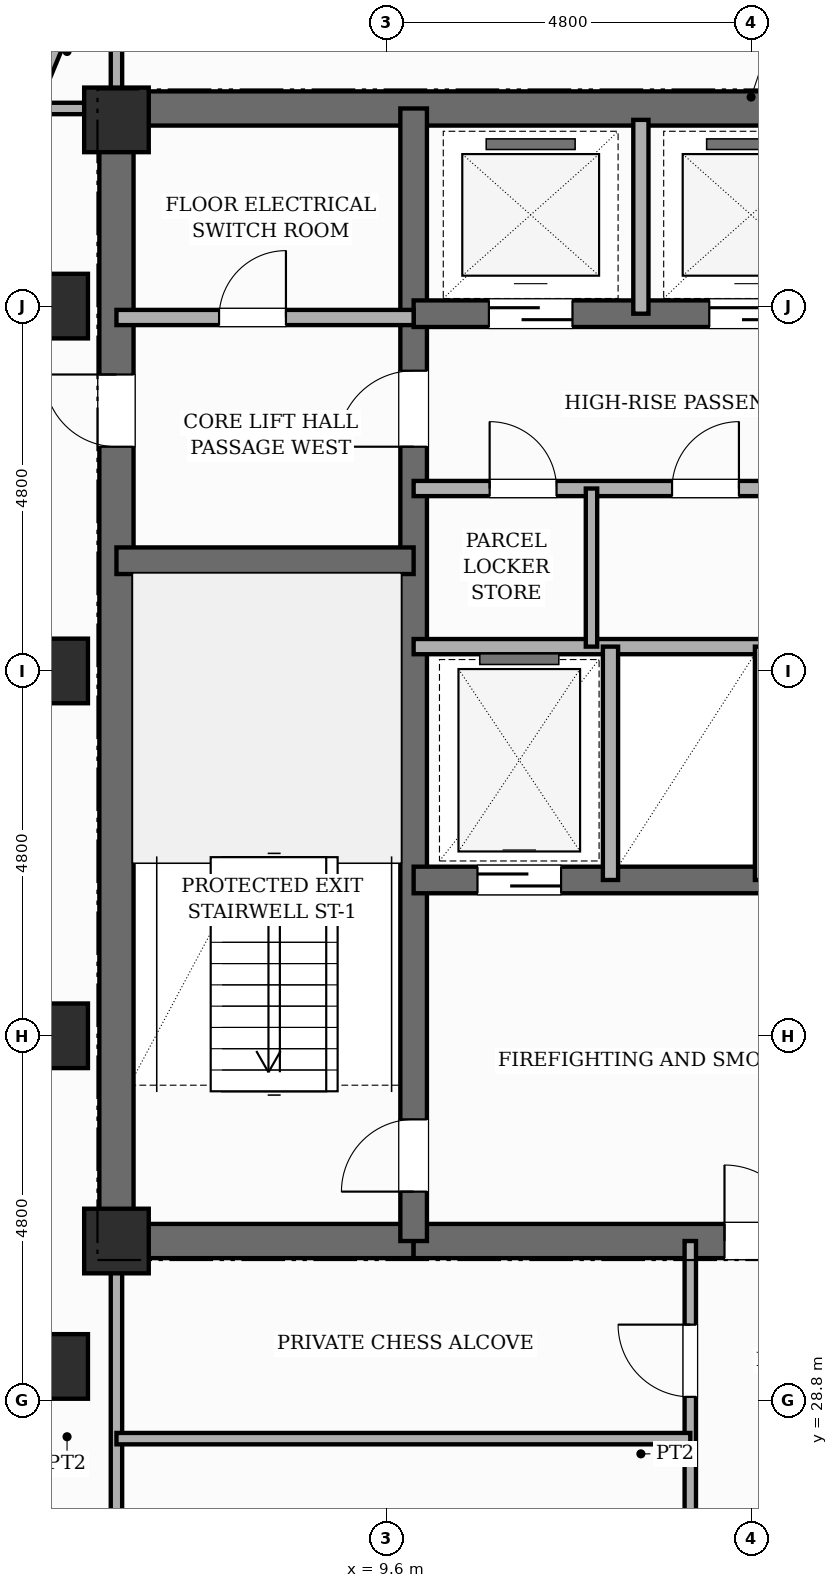
"""IFC4 building model, lengths in metres.
Left out: names, types, materials, properties, quantities, classifications, styles, units other than length and angle.
Written with IfcOpenShell. Run it as: python <this file> out.ifc"""

import sys

from ifc_helpers import new_model, si_unit, direction, frame, frame_2d, origin, origin_2d, place, context, subcontext, project, spatial, rectangle, extrude, element, fill, save


model = new_model("IFC4")
c1 = context("Model", 3, precision=1e-05, world=origin(), true_north=direction((0.0, 1.0)))
c2 = subcontext(c1, "Body", "Model", "MODEL_VIEW")
j1 = project(units=[si_unit("LENGTHUNIT", "METRE"), si_unit("PLANEANGLEUNIT", "RADIAN")], contexts=[c1])
p1 = place(None, origin())
s1 = spatial("IfcSite", under=j1, at=p1, CompositionType="ELEMENT")
p2 = place(p1, origin())
s2 = spatial("IfcBuilding", under=s1, at=p2, CompositionType="ELEMENT")
p3 = place(p2, frame((0.0, 0.0, 239.8)))
s3 = spatial("IfcBuildingStorey", under=s2, at=p3, CompositionType="ELEMENT", Elevation=239.8)
p4 = place(p3, frame((6.05, 30.675, 0.0), z_axis=(0.0, 0.0, 1.0), x_axis=(0.0, 1.0, 0.0)))
e1 = element("IfcWall", 1, at=p4, inside=s3, PredefinedType="SHEAR", context=c2, shape_type="SweptSolid", body=[
    extrude(rectangle(XDim=15.35, YDim=0.45, at=frame_2d((7.675, 0.0))), origin(), (0.0, 0.0, 1.0), 4.3),
])
p5 = place(p4, frame((10.675, 0.0, 0.0)))
e2 = element("IfcOpeningElement", 2, at=p5, cuts=e1, PredefinedType="OPENING", context=c2, shape_type="SweptSolid", body=[
    extrude(rectangle(XDim=0.95, YDim=2.15, at=frame_2d((0.475, 1.075))), frame((0.0, 0.235, 0.0), z_axis=(0.0, -1.0, 0.0), x_axis=(1.0, 0.0, 0.0)), (0.0, 0.0, 1.0), 0.47),
])
p6 = place(p3, frame((6.05, 45.8, 0.0), z_axis=(0.0, 0.0, 1.0), x_axis=(1.0, 0.0, 0.0)))
e3 = element("IfcWall", 3, at=p6, inside=s3, PredefinedType="SHEAR", context=c2, shape_type="SweptSolid", body=[
    extrude(rectangle(XDim=16.7, YDim=0.45, at=frame_2d((8.35, 0.0))), origin(), (0.0, 0.0, 1.0), 4.3),
])
p7 = place(p6, frame((13.57, 0.0, 0.0)))
e4 = element("IfcOpeningElement", 4, at=p7, cuts=e3, PredefinedType="OPENING", context=c2, shape_type="SweptSolid", body=[
    extrude(rectangle(XDim=0.95, YDim=2.15, at=frame_2d((0.475, 1.075))), frame((0.0, 0.235, 0.0), z_axis=(0.0, -1.0, 0.0), x_axis=(1.0, 0.0, 0.0)), (0.0, 0.0, 1.0), 0.47),
])
p8 = place(p3, frame((6.05, 30.9, 0.0), z_axis=(0.0, 0.0, 1.0), x_axis=(1.0, 0.0, 0.0)))
e5 = element("IfcWall", 5, at=p8, inside=s3, PredefinedType="SHEAR", context=c2, shape_type="SweptSolid", body=[
    extrude(rectangle(XDim=3.91, YDim=0.45, at=frame_2d((1.955, 0.0))), origin(), (0.0, 0.0, 1.0), 4.3),
])
p9 = place(p3, frame((9.96, 30.9, 0.0), z_axis=(0.0, 0.0, 1.0), x_axis=(1.0, 0.0, 0.0)))
e6 = element("IfcWall", 6, at=p9, inside=s3, PredefinedType="SHEAR", context=c2, shape_type="SweptSolid", body=[
    extrude(rectangle(XDim=8.88, YDim=0.45, at=frame_2d((4.44, 0.0))), origin(), (0.0, 0.0, 1.0), 4.3),
])
p10 = place(p9, frame((4.09, 0.0, 0.0)))
e7 = element("IfcOpeningElement", 7, at=p10, cuts=e6, PredefinedType="OPENING", context=c2, shape_type="SweptSolid", body=[
    extrude(rectangle(XDim=1.0, YDim=2.15, at=frame_2d((0.5, 1.075))), frame((0.0, 0.235, 0.0), z_axis=(0.0, -1.0, 0.0), x_axis=(1.0, 0.0, 0.0)), (0.0, 0.0, 1.0), 0.47),
])
p11 = place(p3, frame((9.96, 30.9, 0.0), z_axis=(0.0, 0.0, 1.0), x_axis=(0.0, 1.0, 0.0)))
e8 = element("IfcWall", 8, at=p11, inside=s3, PredefinedType="SHEAR", context=c2, shape_type="SweptSolid", body=[
    extrude(rectangle(XDim=14.9, YDim=0.35, at=frame_2d((7.45, 0.0))), origin(), (0.0, 0.0, 1.0), 4.3),
])
p12 = place(p11, frame((0.65, 0.0, 0.0)))
e9 = element("IfcOpeningElement", 9, at=p12, cuts=e8, PredefinedType="OPENING", context=c2, shape_type="SweptSolid", body=[
    extrude(rectangle(XDim=0.95, YDim=2.1, at=frame_2d((0.475, 1.05))), frame((0.0, 0.185, 0.0), z_axis=(0.0, -1.0, 0.0), x_axis=(1.0, 0.0, 0.0)), (0.0, 0.0, 1.0), 0.37),
])
p13 = place(p11, frame((10.45, 0.0, 0.0)))
e10 = element("IfcOpeningElement", 10, at=p13, cuts=e8, PredefinedType="OPENING", context=c2, shape_type="SweptSolid", body=[
    extrude(rectangle(XDim=1.0, YDim=2.15, at=frame_2d((0.5, 1.075))), frame((0.0, 0.185, 0.0), z_axis=(0.0, -1.0, 0.0), x_axis=(1.0, 0.0, 0.0)), (0.0, 0.0, 1.0), 0.37),
])
p14 = place(p3, frame((6.05, 39.85, 0.0), z_axis=(0.0, 0.0, 1.0), x_axis=(1.0, 0.0, 0.0)))
e11 = element("IfcWall", 11, at=p14, inside=s3, PredefinedType="SHEAR", context=c2, shape_type="SweptSolid", body=[
    extrude(rectangle(XDim=3.91, YDim=0.35, at=frame_2d((1.955, 0.0))), origin(), (0.0, 0.0, 1.0), 4.3),
])
p15 = place(p3, frame((9.96, 35.65, 0.0), z_axis=(0.0, 0.0, 1.0), x_axis=(1.0, 0.0, 0.0)))
e12 = element("IfcWall", 12, at=p15, inside=s3, PredefinedType="SHEAR", context=c2, shape_type="SweptSolid", body=[
    extrude(rectangle(XDim=8.88, YDim=0.35, at=frame_2d((4.44, 0.0))), origin(), (0.0, 0.0, 1.0), 4.3),
])
p16 = place(p15, frame((0.84, 0.0, 0.0)))
e13 = element("IfcOpeningElement", 13, at=p16, cuts=e12, PredefinedType="OPENING", context=c2, shape_type="SweptSolid", body=[
    extrude(rectangle(XDim=1.1, YDim=2.15, at=frame_2d((0.55, 1.075))), frame((0.0, 0.185, 0.0), z_axis=(0.0, -1.0, 0.0), x_axis=(1.0, 0.0, 0.0)), (0.0, 0.0, 1.0), 0.37),
])
p17 = place(p15, frame((5.24, 0.0, 0.0)))
e14 = element("IfcOpeningElement", 14, at=p17, cuts=e12, PredefinedType="OPENING", context=c2, shape_type="SweptSolid", body=[
    extrude(rectangle(XDim=1.1, YDim=2.15, at=frame_2d((0.55, 1.075))), frame((0.0, 0.185, 0.0), z_axis=(0.0, -1.0, 0.0), x_axis=(1.0, 0.0, 0.0)), (0.0, 0.0, 1.0), 0.37),
])
p18 = place(p15, frame((7.5, 0.0, 0.0)))
e15 = element("IfcOpeningElement", 15, at=p18, cuts=e12, PredefinedType="OPENING", context=c2, shape_type="SweptSolid", body=[
    extrude(rectangle(XDim=0.88, YDim=2.1, at=frame_2d((0.44, 1.05))), frame((0.0, 0.185, 0.0), z_axis=(0.0, -1.0, 0.0), x_axis=(1.0, 0.0, 0.0)), (0.0, 0.0, 1.0), 0.37),
])
p19 = place(p3, frame((9.96, 43.1, 0.0), z_axis=(0.0, 0.0, 1.0), x_axis=(1.0, 0.0, 0.0)))
e16 = element("IfcWall", 16, at=p19, inside=s3, PredefinedType="SHEAR", context=c2, shape_type="SweptSolid", body=[
    extrude(rectangle(XDim=8.88, YDim=0.35, at=frame_2d((4.44, 0.0))), origin(), (0.0, 0.0, 1.0), 4.3),
])
p20 = place(p19, frame((0.99, 0.0, 0.0)))
e17 = element("IfcOpeningElement", 17, at=p20, cuts=e16, PredefinedType="OPENING", context=c2, shape_type="SweptSolid", body=[
    extrude(rectangle(XDim=1.1, YDim=2.15, at=frame_2d((0.55, 1.075))), frame((0.0, 0.185, 0.0), z_axis=(0.0, -1.0, 0.0), x_axis=(1.0, 0.0, 0.0)), (0.0, 0.0, 1.0), 0.37),
])
p21 = place(p19, frame((3.89, 0.0, 0.0)))
e18 = element("IfcOpeningElement", 18, at=p21, cuts=e16, PredefinedType="OPENING", context=c2, shape_type="SweptSolid", body=[
    extrude(rectangle(XDim=1.1, YDim=2.15, at=frame_2d((0.55, 1.075))), frame((0.0, 0.185, 0.0), z_axis=(0.0, -1.0, 0.0), x_axis=(1.0, 0.0, 0.0)), (0.0, 0.0, 1.0), 0.37),
])
p22 = place(p19, frame((6.79, 0.0, 0.0)))
e19 = element("IfcOpeningElement", 19, at=p22, cuts=e16, PredefinedType="OPENING", context=c2, shape_type="SweptSolid", body=[
    extrude(rectangle(XDim=1.1, YDim=2.15, at=frame_2d((0.55, 1.075))), frame((0.0, 0.185, 0.0), z_axis=(0.0, -1.0, 0.0), x_axis=(1.0, 0.0, 0.0)), (0.0, 0.0, 1.0), 0.37),
])
for number, where, z_axis, x_axis in (
    (20, (5.25, 29.25, 0.0), (0.0, 0.0, 1.0), (1.0, 0.0, 0.0)),
    (21, (5.25, 33.6, 0.0), (0.0, 0.0, 1.0), (1.0, 0.0, 0.0)),
    (22, (5.25, 38.4, 0.0), (0.0, 0.0, 1.0), (1.0, 0.0, 0.0)),
    (23, (5.25, 43.2, 0.0), (0.0, 0.0, 1.0), (1.0, 0.0, 0.0)),
    (24, (6.05, 30.9, 0.0), (0.0, 0.0, 1.0), (1.0, 0.0, 0.0)),
    (25, (6.05, 45.65, 0.0), (0.0, 0.0, 1.0), (1.0, 0.0, 0.0)),
):
    element("IfcColumn", number, at=place(p3, frame(where, z_axis=z_axis, x_axis=x_axis)), inside=s3, PredefinedType="COLUMN", context=c2, shape_type="SweptSolid", body=[
        extrude(rectangle(XDim=0.85, YDim=0.85, at=origin_2d()), origin(), (0.0, 0.0, 1.0), 4.3),
    ])
p23 = place(p3, frame((5.011, 46.167, 0.0), z_axis=(0.0, 0.0, 1.0), x_axis=(0.382650053678, 0.92389335771, 0.0)))
e26 = element("IfcWall", 26, at=p23, inside=s3, PredefinedType="STANDARD", context=c2, shape_type="SweptSolid", body=[
    extrude(rectangle(XDim=0.626, YDim=0.28, at=frame_2d((0.313, 0.0))), origin(), (0.0, 0.0, 1.0), 4.04),
])
p24 = place(p3, frame((9.96, 38.72, 0.0), z_axis=(0.0, 0.0, 1.0), x_axis=(1.0, 0.0, 0.0)))
e27 = element("IfcWall", 27, at=p24, inside=s3, PredefinedType="POLYGONAL", context=c2, shape_type="SweptSolid", body=[
    extrude(rectangle(XDim=7.06, YDim=0.2, at=frame_2d((3.53, 0.0))), origin(), (0.0, 0.0, 1.0), 4.04),
])
for number, where, z_axis, x_axis in (
    (28, (12.55, 35.65, 0.0), (0.0, 0.0, 1.0), (0.0, 1.0, 0.0)),
    (29, (14.55, 35.65, 0.0), (0.0, 0.0, 1.0), (0.0, 1.0, 0.0)),
):
    element("IfcWall", number, at=place(p3, frame(where, z_axis=z_axis, x_axis=x_axis)), inside=s3, PredefinedType="POLYGONAL", context=c2, shape_type="SweptSolid", body=[
        extrude(rectangle(XDim=3.07, YDim=0.2, at=frame_2d((1.535, 0.0))), origin(), (0.0, 0.0, 1.0), 4.04),
    ])
p25 = place(p3, frame((9.96, 40.8, 0.0), z_axis=(0.0, 0.0, 1.0), x_axis=(1.0, 0.0, 0.0)))
e30 = element("IfcWall", 30, at=p25, inside=s3, PredefinedType="POLYGONAL", context=c2, shape_type="SweptSolid", body=[
    extrude(rectangle(XDim=8.88, YDim=0.2, at=frame_2d((4.44, 0.0))), origin(), (0.0, 0.0, 1.0), 4.04),
])
p26 = place(p25, frame((7.5, 0.0, 0.0)))
e31 = element("IfcOpeningElement", 31, at=p26, cuts=e30, PredefinedType="OPENING", context=c2, shape_type="SweptSolid", body=[
    extrude(rectangle(XDim=0.88, YDim=2.1, at=frame_2d((0.44, 1.05))), frame((0.0, 0.11, 0.0), z_axis=(0.0, -1.0, 0.0), x_axis=(1.0, 0.0, 0.0)), (0.0, 0.0, 1.0), 0.22),
])
p27 = place(p25, frame((1.0, 0.0, 0.0)))
e32 = element("IfcOpeningElement", 32, at=p27, cuts=e30, PredefinedType="OPENING", context=c2, shape_type="SweptSolid", body=[
    extrude(rectangle(XDim=0.88, YDim=2.1, at=frame_2d((0.44, 1.05))), frame((0.0, 0.11, 0.0), z_axis=(0.0, -1.0, 0.0), x_axis=(1.0, 0.0, 0.0)), (0.0, 0.0, 1.0), 0.22),
])
p28 = place(p25, frame((3.4, 0.0, 0.0)))
e33 = element("IfcOpeningElement", 33, at=p28, cuts=e30, PredefinedType="OPENING", context=c2, shape_type="SweptSolid", body=[
    extrude(rectangle(XDim=0.88, YDim=2.1, at=frame_2d((0.44, 1.05))), frame((0.0, 0.11, 0.0), z_axis=(0.0, -1.0, 0.0), x_axis=(1.0, 0.0, 0.0)), (0.0, 0.0, 1.0), 0.22),
])
p29 = place(p25, frame((5.55, 0.0, 0.0)))
e34 = element("IfcOpeningElement", 34, at=p29, cuts=e30, PredefinedType="OPENING", context=c2, shape_type="SweptSolid", body=[
    extrude(rectangle(XDim=0.88, YDim=2.1, at=frame_2d((0.44, 1.05))), frame((0.0, 0.11, 0.0), z_axis=(0.0, -1.0, 0.0), x_axis=(1.0, 0.0, 0.0)), (0.0, 0.0, 1.0), 0.22),
])
p30 = place(p3, frame((6.05, 43.05, 0.0), z_axis=(0.0, 0.0, 1.0), x_axis=(1.0, 0.0, 0.0)))
e35 = element("IfcWall", 35, at=p30, inside=s3, PredefinedType="POLYGONAL", context=c2, shape_type="SweptSolid", body=[
    extrude(rectangle(XDim=3.91, YDim=0.2, at=frame_2d((1.955, 0.0))), origin(), (0.0, 0.0, 1.0), 3.32),
])
p31 = place(p30, frame((1.35, 0.0, 0.0)))
e36 = element("IfcOpeningElement", 36, at=p31, cuts=e35, PredefinedType="OPENING", context=c2, shape_type="SweptSolid", body=[
    extrude(rectangle(XDim=0.88, YDim=2.1, at=frame_2d((0.44, 1.05))), frame((0.0, 0.11, 0.0), z_axis=(0.0, -1.0, 0.0), x_axis=(1.0, 0.0, 0.0)), (0.0, 0.0, 1.0), 0.22),
])
p32 = place(p3, frame((12.95, 43.1, 0.0), z_axis=(0.0, 0.0, 1.0), x_axis=(0.0, 1.0, 0.0)))
e37 = element("IfcWall", 37, at=p32, inside=s3, PredefinedType="POLYGONAL", context=c2, shape_type="SweptSolid", body=[
    extrude(rectangle(XDim=2.55, YDim=0.2, at=frame_2d((1.275, 0.0))), origin(), (0.0, 0.0, 1.0), 4.04),
])
p33 = place(p3, frame((12.3, 38.72, 0.0), z_axis=(0.0, 0.0, 1.0), x_axis=(0.0, 1.0, 0.0)))
e38 = element("IfcWall", 38, at=p33, inside=s3, PredefinedType="PARTITIONING", context=c2, shape_type="SweptSolid", body=[
    extrude(rectangle(XDim=2.08, YDim=0.15, at=frame_2d((1.04, 0.0))), origin(), (0.0, 0.0, 1.0), 4.04),
])
p34 = place(p3, frame((13.6, 25.75, 0.0), z_axis=(0.0, 0.0, 1.0), x_axis=(0.0, 1.0, 0.0)))
e39 = element("IfcWall", 39, at=p34, inside=s3, PredefinedType="PARTITIONING", context=c2, shape_type="SweptSolid", body=[
    extrude(rectangle(XDim=5.15, YDim=0.15, at=frame_2d((2.575, 0.0))), origin(), (0.0, 0.0, 1.0), 4.04),
])
p35 = place(p34, frame((0.65, 0.0, 0.0)))
e40 = element("IfcOpeningElement", 40, at=p35, cuts=e39, PredefinedType="OPENING", context=c2, shape_type="SweptSolid", body=[
    extrude(rectangle(XDim=0.95, YDim=2.15, at=frame_2d((0.475, 1.075))), frame((0.0, 0.085, 0.0), z_axis=(0.0, -1.0, 0.0), x_axis=(1.0, 0.0, 0.0)), (0.0, 0.0, 1.0), 0.17),
])
p36 = place(p34, frame((3.1, 0.0, 0.0)))
e41 = element("IfcOpeningElement", 41, at=p36, cuts=e39, PredefinedType="OPENING", context=c2, shape_type="SweptSolid", body=[
    extrude(rectangle(XDim=0.95, YDim=2.15, at=frame_2d((0.475, 1.075))), frame((0.0, 0.085, 0.0), z_axis=(0.0, -1.0, 0.0), x_axis=(1.0, 0.0, 0.0)), (0.0, 0.0, 1.0), 0.17),
])
p37 = place(p3, frame((6.05, 25.75, 0.0), z_axis=(0.0, 0.0, 1.0), x_axis=(0.0, 1.0, 0.0)))
e42 = element("IfcWall", 42, at=p37, inside=s3, PredefinedType="PARTITIONING", context=c2, shape_type="SweptSolid", body=[
    extrude(rectangle(XDim=5.15, YDim=0.15, at=frame_2d((2.575, 0.0))), origin(), (0.0, 0.0, 1.0), 4.04),
])
p38 = place(p3, frame((6.05, 28.3, 0.0), z_axis=(0.0, 0.0, 1.0), x_axis=(1.0, 0.0, 0.0)))
e43 = element("IfcWall", 43, at=p38, inside=s3, PredefinedType="PARTITIONING", context=c2, shape_type="SweptSolid", body=[
    extrude(rectangle(XDim=7.55, YDim=0.15, at=frame_2d((3.775, 0.0))), origin(), (0.0, 0.0, 1.0), 4.04),
])
p39 = place(p3, frame((5.12, 45.8, 0.0), z_axis=(0.0, 0.0, 1.0), x_axis=(1.0, 0.0, 0.0)))
e44 = element("IfcWall", 44, at=p39, inside=s3, PredefinedType="PARTITIONING", context=c2, shape_type="SweptSolid", body=[
    extrude(rectangle(XDim=0.93, YDim=0.15, at=frame_2d((0.465, 0.0))), origin(), (0.0, 0.0, 1.0), 4.04),
])
p40 = place(p3, frame((6.05, 45.8, 0.0), z_axis=(0.0, 0.0, 1.0), x_axis=(0.0, 1.0, 0.0)))
e45 = element("IfcWall", 45, at=p40, inside=s3, PredefinedType="PARTITIONING", context=c2, shape_type="SweptSolid", body=[
    extrude(rectangle(XDim=1.5, YDim=0.15, at=frame_2d((0.75, 0.0))), origin(), (0.0, 0.0, 1.0), 4.04),
])
p41 = place(p12, origin())
e46 = element("IfcDoor", 46, at=p41, inside=s3, OperationType="SINGLE_SWING_LEFT", PredefinedType="DOOR", context=c2, shape_type="SweptSolid", body=[
    extrude(rectangle(XDim=0.95, YDim=2.1, at=frame_2d((0.475, 1.05))), frame((0.0, 0.025, 0.0), z_axis=(0.0, -1.0, 0.0), x_axis=(1.0, 0.0, 0.0)), (0.0, 0.0, 1.0), 0.05),
])
fill(e9, e46)
p42 = place(p10, origin())
e47 = element("IfcDoor", 47, at=p42, inside=s3, OperationType="SINGLE_SWING_LEFT", PredefinedType="DOOR", context=c2, shape_type="SweptSolid", body=[
    extrude(rectangle(XDim=1.0, YDim=2.15, at=frame_2d((0.5, 1.075))), frame((0.0, 0.025, 0.0), z_axis=(0.0, -1.0, 0.0), x_axis=(1.0, 0.0, 0.0)), (0.0, 0.0, 1.0), 0.05),
])
fill(e7, e47)
p43 = place(p16, origin())
e48 = element("IfcDoor", 48, at=p43, inside=s3, OperationType="SLIDING_TO_LEFT", PredefinedType="DOOR", context=c2, shape_type="SweptSolid", body=[
    extrude(rectangle(XDim=1.1, YDim=2.15, at=frame_2d((0.55, 1.075))), frame((0.0, 0.025, 0.0), z_axis=(0.0, -1.0, 0.0), x_axis=(1.0, 0.0, 0.0)), (0.0, 0.0, 1.0), 0.05),
])
fill(e13, e48)
p44 = place(p20, origin())
e49 = element("IfcDoor", 49, at=p44, inside=s3, OperationType="SLIDING_TO_LEFT", PredefinedType="DOOR", context=c2, shape_type="SweptSolid", body=[
    extrude(rectangle(XDim=1.1, YDim=2.15, at=frame_2d((0.55, 1.075))), frame((0.0, 0.025, 0.0), z_axis=(0.0, -1.0, 0.0), x_axis=(1.0, 0.0, 0.0)), (0.0, 0.0, 1.0), 0.05),
])
fill(e17, e49)
p45 = place(p21, origin())
e50 = element("IfcDoor", 50, at=p45, inside=s3, OperationType="SLIDING_TO_RIGHT", PredefinedType="DOOR", context=c2, shape_type="SweptSolid", body=[
    extrude(rectangle(XDim=1.1, YDim=2.15, at=frame_2d((0.55, 1.075))), frame((0.0, 0.025, 0.0), z_axis=(0.0, -1.0, 0.0), x_axis=(1.0, 0.0, 0.0)), (0.0, 0.0, 1.0), 0.05),
])
fill(e18, e50)
p46 = place(p13, origin())
e51 = element("IfcDoor", 51, at=p46, inside=s3, OperationType="SINGLE_SWING_LEFT", PredefinedType="DOOR", context=c2, shape_type="SweptSolid", body=[
    extrude(rectangle(XDim=1.0, YDim=2.15, at=frame_2d((0.5, 1.075))), frame((0.0, 0.025, 0.0), z_axis=(0.0, -1.0, 0.0), x_axis=(1.0, 0.0, 0.0)), (0.0, 0.0, 1.0), 0.05),
])
fill(e10, e51)
p47 = place(p5, origin())
e52 = element("IfcDoor", 52, at=p47, inside=s3, OperationType="SINGLE_SWING_RIGHT", PredefinedType="DOOR", context=c2, shape_type="SweptSolid", body=[
    extrude(rectangle(XDim=0.95, YDim=2.15, at=frame_2d((0.475, 1.075))), frame((0.0, 0.025, 0.0), z_axis=(0.0, -1.0, 0.0), x_axis=(1.0, 0.0, 0.0)), (0.0, 0.0, 1.0), 0.05),
])
fill(e2, e52)
p48 = place(p31, origin())
e53 = element("IfcDoor", 53, at=p48, inside=s3, OperationType="SINGLE_SWING_RIGHT", PredefinedType="DOOR", context=c2, shape_type="SweptSolid", body=[
    extrude(rectangle(XDim=0.88, YDim=2.1, at=frame_2d((0.44, 1.05))), frame((0.0, 0.025, 0.0), z_axis=(0.0, -1.0, 0.0), x_axis=(1.0, 0.0, 0.0)), (0.0, 0.0, 1.0), 0.05),
])
fill(e36, e53)
p49 = place(p27, origin())
e54 = element("IfcDoor", 54, at=p49, inside=s3, OperationType="SINGLE_SWING_LEFT", PredefinedType="DOOR", context=c2, shape_type="SweptSolid", body=[
    extrude(rectangle(XDim=0.88, YDim=2.1, at=frame_2d((0.44, 1.05))), frame((0.0, 0.025, 0.0), z_axis=(0.0, -1.0, 0.0), x_axis=(1.0, 0.0, 0.0)), (0.0, 0.0, 1.0), 0.05),
])
fill(e32, e54)
p50 = place(p28, origin())
e55 = element("IfcDoor", 55, at=p50, inside=s3, OperationType="SINGLE_SWING_RIGHT", PredefinedType="DOOR", context=c2, shape_type="SweptSolid", body=[
    extrude(rectangle(XDim=0.88, YDim=2.1, at=frame_2d((0.44, 1.05))), frame((0.0, 0.025, 0.0), z_axis=(0.0, -1.0, 0.0), x_axis=(1.0, 0.0, 0.0)), (0.0, 0.0, 1.0), 0.05),
])
fill(e33, e55)
p51 = place(p36, origin())
e56 = element("IfcDoor", 56, at=p51, inside=s3, OperationType="SINGLE_SWING_RIGHT", PredefinedType="DOOR", context=c2, shape_type="SweptSolid", body=[
    extrude(rectangle(XDim=0.95, YDim=2.15, at=frame_2d((0.475, 1.075))), frame((0.0, 0.025, 0.0), z_axis=(0.0, -1.0, 0.0), x_axis=(1.0, 0.0, 0.0)), (0.0, 0.0, 1.0), 0.05),
])
fill(e41, e56)
save(model, sys.argv[1])
